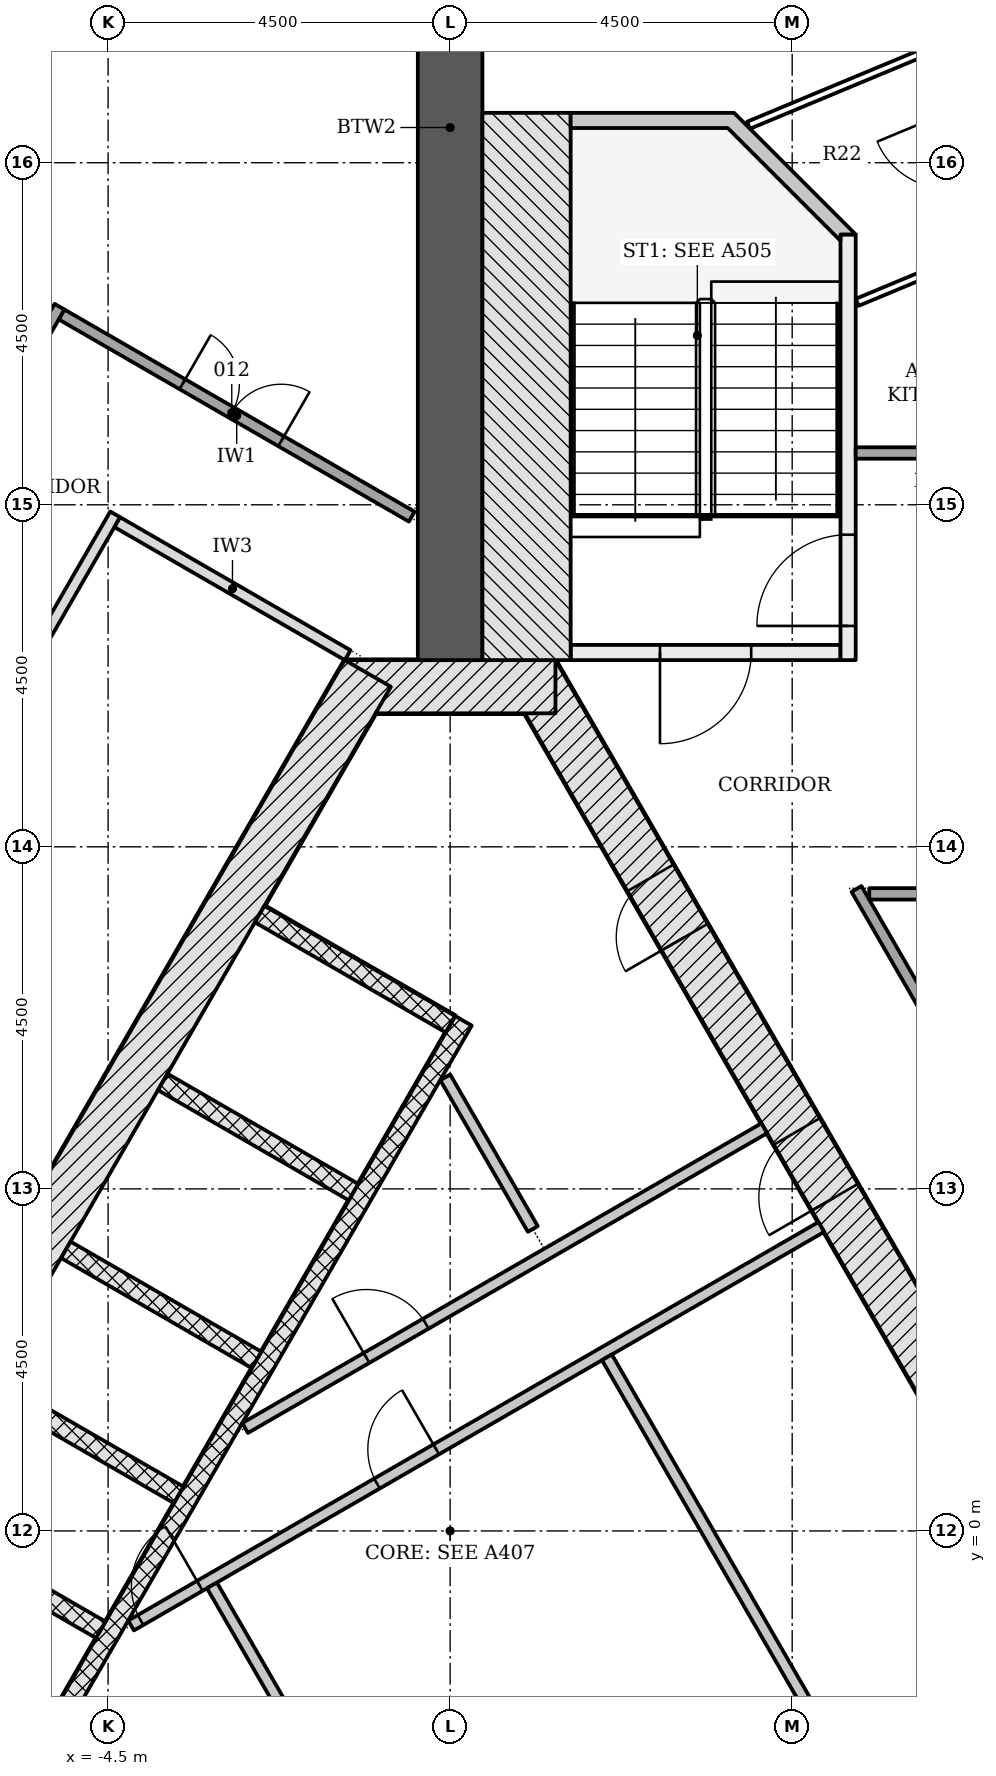
"""IFC4 building model, lengths in metres.
Left out: names, types, materials, properties, quantities, classifications, styles, units other than length and angle.
Written with IfcOpenShell. Run it as: python <this file> out.ifc"""

import sys

from ifc_helpers import new_model, si_unit, direction, frame, frame_2d, origin, place, context, subcontext, project, spatial, polyline, rectangle, outline, extrude, element, fill, save


model = new_model("IFC4")
c1 = context("Model", 3, precision=1e-05, world=origin(), true_north=direction((0.0, 1.0)))
c2 = subcontext(c1, "Body", "Model", "MODEL_VIEW")
j1 = project(units=[si_unit("LENGTHUNIT", "METRE"), si_unit("PLANEANGLEUNIT", "RADIAN")], contexts=[c1])
p1 = place(None, origin())
s1 = spatial("IfcSite", under=j1, at=p1, CompositionType="ELEMENT")
p2 = place(p1, origin())
s2 = spatial("IfcBuilding", under=s1, at=p2, CompositionType="ELEMENT")
p3 = place(p2, frame((0.0, 0.0, 45.6)))
s3 = spatial("IfcBuildingStorey", under=s2, at=p3, CompositionType="ELEMENT", Elevation=45.6)
p4 = place(p3, frame((10.311, -4.703, -0.2), z_axis=(0.0, 0.0, 1.0), x_axis=(-0.500001446645, 0.866024568562, 0.0)))
e1 = element("IfcWall", 1, at=p4, inside=s3, PredefinedType="SHEAR", context=c2, shape_type="SweptSolid", body=[
    extrude(rectangle(XDim=18.458, YDim=0.7, at=frame_2d((9.229, 0.0))), origin(), (0.0, 0.0, 1.0), 3.6),
])
p5 = place(p4, frame((10.5, 0.0, 0.2)))
e2 = element("IfcOpeningElement", 2, at=p5, cuts=e1, PredefinedType="OPENING", context=c2, shape_type="SweptSolid", body=[
    extrude(rectangle(XDim=1.0, YDim=2.1, at=frame_2d((0.5, 1.05))), frame((0.0, 0.36, 0.0), z_axis=(0.0, -1.0, 0.0), x_axis=(1.0, 0.0, 0.0)), (0.0, 0.0, 1.0), 0.72),
])
p6 = place(p4, frame((4.877, 0.0, 0.2)))
e3 = element("IfcOpeningElement", 3, at=p6, cuts=e1, PredefinedType="OPENING", context=c2, shape_type="SweptSolid", body=[
    extrude(rectangle(XDim=0.9, YDim=2.1, at=frame_2d((0.45, 1.05))), frame((0.0, 0.36, 0.0), z_axis=(0.0, -1.0, 0.0), x_axis=(1.0, 0.0, 0.0)), (0.0, 0.0, 1.0), 0.72),
])
p7 = place(p4, frame((14.452, 0.0, 0.2)))
e4 = element("IfcOpeningElement", 4, at=p7, cuts=e1, PredefinedType="OPENING", context=c2, shape_type="SweptSolid", body=[
    extrude(rectangle(XDim=0.9, YDim=2.1, at=frame_2d((0.45, 1.05))), frame((0.0, 0.36, 0.0), z_axis=(0.0, -1.0, 0.0), x_axis=(1.0, 0.0, 0.0)), (0.0, 0.0, 1.0), 0.72),
])
p8 = place(p3, frame((1.386, 11.106, -0.2), z_axis=(0.0, 0.0, 1.0), x_axis=(-1.0, 0.0, 0.0)))
e5 = element("IfcWall", 5, at=p8, inside=s3, PredefinedType="SHEAR", context=c2, shape_type="SweptSolid", body=[
    extrude(rectangle(XDim=2.771, YDim=0.7, at=frame_2d((1.386, 0.0))), origin(), (0.0, 0.0, 1.0), 3.6),
])
p9 = place(p3, frame((-1.083, 11.281, -0.2), z_axis=(0.0, 0.0, 1.0), x_axis=(-0.500001446645, -0.866024568562, 0.0)))
e6 = element("IfcWall", 6, at=p9, inside=s3, PredefinedType="SHEAR", context=c2, shape_type="SweptSolid", body=[
    extrude(rectangle(XDim=18.458, YDim=0.7, at=frame_2d((9.229, 0.0))), origin(), (0.0, 0.0, 1.0), 3.6),
])
p10 = place(p9, frame((8.979, 0.0, 0.2)))
e7 = element("IfcOpeningElement", 7, at=p10, cuts=e6, PredefinedType="OPENING", context=c2, shape_type="SweptSolid", body=[
    extrude(rectangle(XDim=1.2, YDim=2.1, at=frame_2d((0.6, 1.05))), frame((0.0, 0.36, 0.0), z_axis=(0.0, -1.0, 0.0), x_axis=(1.0, 0.0, 0.0)), (0.0, 0.0, 1.0), 0.72),
])
p11 = place(p9, frame((11.029, 0.0, 0.2)))
e8 = element("IfcOpeningElement", 8, at=p11, cuts=e6, PredefinedType="OPENING", context=c2, shape_type="SweptSolid", body=[
    extrude(rectangle(XDim=1.2, YDim=2.1, at=frame_2d((0.6, 1.05))), frame((0.0, 0.36, 0.0), z_axis=(0.0, -1.0, 0.0), x_axis=(1.0, 0.0, 0.0)), (0.0, 0.0, 1.0), 0.72),
])
p12 = place(p3, frame((0.0, 11.456, -0.2), z_axis=(0.0, 0.0, 1.0), x_axis=(0.0, 1.0, 0.0)))
e9 = element("IfcWall", 9, at=p12, inside=s3, PredefinedType="SHEAR", context=c2, shape_type="SweptSolid", body=[
    extrude(rectangle(XDim=14.014, YDim=0.85, at=frame_2d((7.007, 0.0))), origin(), (0.0, 0.0, 1.0), 3.6),
])
p13 = place(p3, frame((-2.506, 8.115, -0.2), z_axis=(0.0, 0.0, 1.0), x_axis=(0.865996321171, -0.50005036918, 0.0)))
e10 = element("IfcWall", 10, at=p13, inside=s3, PredefinedType="PARTITIONING", context=c2, shape_type="SweptSolid", body=[
    extrude(rectangle(XDim=2.9, YDim=0.25, at=frame_2d((1.45, 0.0))), origin(), (0.0, 0.0, 1.0), 3.6),
])
for number, where, z_axis, x_axis in (
    (11, (-3.781, 5.907, -0.2), (0.0, 0.0, 1.0), (0.866, -0.5, 0.0)),
    (12, (-5.056, 3.699, -0.2), (0.0, 0.0, 1.0), (0.866, -0.5, 0.0)),
    (13, (-6.081, 1.923, -0.2), (0.0, 0.0, 1.0), (0.866, -0.5, 0.0)),
    (14, (-7.106, 0.148, -0.2), (0.0, 0.0, 1.0), (0.866, -0.5, 0.0)),
):
    element("IfcWall", number, at=place(p3, frame(where, z_axis=z_axis, x_axis=x_axis)), inside=s3, PredefinedType="PARTITIONING", context=c2, shape_type="SweptSolid", body=[
        extrude(rectangle(XDim=2.9, YDim=0.25, at=frame_2d((1.45, 0.0))), origin(), (0.0, 0.0, 1.0), 3.6),
    ])
p14 = place(p3, frame((0.176, 6.711, 0.0), z_axis=(0.0, 0.0, 1.0), x_axis=(-0.500004227369, -0.866022963098, 0.0)))
e15 = element("IfcWall", 15, at=p14, inside=s3, PredefinedType="PARTITIONING", context=c2, shape_type="SweptSolid", body=[
    extrude(rectangle(XDim=11.8, YDim=0.25, at=frame_2d((5.9, 0.0))), origin(), (0.0, 0.0, 1.0), 3.4),
])
p15 = place(p3, frame((-4.198, -1.244, 0.0), z_axis=(0.0, 0.0, 1.0), x_axis=(0.866020798945, 0.500007975732, 0.0)))
e16 = element("IfcWall", 16, at=p15, inside=s3, PredefinedType="PARTITIONING", context=c2, shape_type="SweptSolid", body=[
    extrude(rectangle(XDim=10.486, YDim=0.15, at=frame_2d((5.243, 0.0))), origin(), (0.0, 0.0, 1.0), 3.4),
])
p16 = place(p15, frame((3.736, 0.0, 0.0)))
e17 = element("IfcOpeningElement", 17, at=p16, cuts=e16, PredefinedType="OPENING", context=c2, shape_type="SweptSolid", body=[
    extrude(rectangle(XDim=0.9, YDim=2.1, at=frame_2d((0.45, 1.05))), frame((0.0, 0.085, 0.0), z_axis=(0.0, -1.0, 0.0), x_axis=(1.0, 0.0, 0.0)), (0.0, 0.0, 1.0), 0.17),
])
p17 = place(p15, frame((0.144, 0.0, 0.0)))
e18 = element("IfcOpeningElement", 18, at=p17, cuts=e16, PredefinedType="OPENING", context=c2, shape_type="SweptSolid", body=[
    extrude(rectangle(XDim=0.9, YDim=2.1, at=frame_2d((0.45, 1.05))), frame((0.0, 0.085, 0.0), z_axis=(0.0, -1.0, 0.0), x_axis=(1.0, 0.0, 0.0)), (0.0, 0.0, 1.0), 0.17),
])
p18 = place(p3, frame((5.367, -3.439, 0.0), z_axis=(0.0, 0.0, 1.0), x_axis=(-0.499981499682, 0.866036084685, 0.0)))
e19 = element("IfcWall", 19, at=p18, inside=s3, PredefinedType="PARTITIONING", context=c2, shape_type="SweptSolid", body=[
    extrude(rectangle(XDim=6.608, YDim=0.15, at=frame_2d((3.304, 0.0))), origin(), (0.0, 0.0, 1.0), 3.4),
])
p19 = place(p3, frame((-1.561, -3.439, 0.0), z_axis=(0.0, 0.0, 1.0), x_axis=(-0.499989077369, 0.866031709877, 0.0)))
e20 = element("IfcWall", 20, at=p19, inside=s3, PredefinedType="PARTITIONING", context=c2, shape_type="SweptSolid", body=[
    extrude(rectangle(XDim=3.144, YDim=0.15, at=frame_2d((1.572, 0.0))), origin(), (0.0, 0.0, 1.0), 3.4),
])
p20 = place(p3, frame((-2.698, 1.354, 0.0), z_axis=(0.0, 0.0, 1.0), x_axis=(0.866021157486, 0.500007354732, 0.0)))
e21 = element("IfcWall", 21, at=p20, inside=s3, PredefinedType="PARTITIONING", context=c2, shape_type="SweptSolid", body=[
    extrude(rectangle(XDim=7.888, YDim=0.15, at=frame_2d((3.944, 0.0))), origin(), (0.0, 0.0, 1.0), 3.4),
])
p21 = place(p20, frame((1.845, 0.0, 0.0)))
e22 = element("IfcOpeningElement", 22, at=p21, cuts=e21, PredefinedType="OPENING", context=c2, shape_type="SweptSolid", body=[
    extrude(rectangle(XDim=0.9, YDim=2.1, at=frame_2d((0.45, 1.05))), frame((0.0, 0.085, 0.0), z_axis=(0.0, -1.0, 0.0), x_axis=(1.0, 0.0, 0.0)), (0.0, 0.0, 1.0), 0.17),
])
p22 = place(p3, frame((1.088, 3.972, 0.0), z_axis=(0.0, 0.0, 1.0), x_axis=(-0.500116913307, 0.865957893332, 0.0)))
e23 = element("IfcWall", 23, at=p22, inside=s3, PredefinedType="PARTITIONING", context=c2, shape_type="SweptSolid", body=[
    extrude(rectangle(XDim=2.304, YDim=0.15, at=frame_2d((1.152, 0.0))), origin(), (0.0, 0.0, 1.0), 3.4),
])
p23 = place(p3, frame((5.135, 11.556, -0.2), z_axis=(0.0, 0.0, 1.0), x_axis=(-1.0, 0.0, 0.0)))
e24 = element("IfcWall", 24, at=p23, inside=s3, PredefinedType="SHEAR", context=c2, shape_type="SweptSolid", body=[
    extrude(rectangle(XDim=3.55, YDim=0.2, at=frame_2d((1.775, 0.0))), origin(), (0.0, 0.0, 1.0), 3.6),
])
p24 = place(p23, frame((1.175, 0.0, 0.2)))
e25 = element("IfcOpeningElement", 25, at=p24, cuts=e24, PredefinedType="OPENING", context=c2, shape_type="SweptSolid", body=[
    extrude(rectangle(XDim=1.2, YDim=2.1, at=frame_2d((0.6, 1.05))), frame((0.0, 0.11, 0.0), z_axis=(0.0, -1.0, 0.0), x_axis=(1.0, 0.0, 0.0)), (0.0, 0.0, 1.0), 0.22),
])
p25 = place(p3, frame((5.236, 11.456, -0.2), z_axis=(0.0, 0.0, 1.0), x_axis=(0.0, 1.0, 0.0)))
e26 = element("IfcWall", 26, at=p25, inside=s3, PredefinedType="SHEAR", context=c2, shape_type="SweptSolid", body=[
    extrude(rectangle(XDim=5.6, YDim=0.2, at=frame_2d((2.8, 0.0))), origin(), (0.0, 0.0, 1.0), 3.6),
])
p26 = place(p25, frame((0.45, 0.0, 0.2)))
e27 = element("IfcOpeningElement", 27, at=p26, cuts=e26, PredefinedType="OPENING", context=c2, shape_type="SweptSolid", body=[
    extrude(rectangle(XDim=1.2, YDim=2.1, at=frame_2d((0.6, 1.05))), frame((0.0, 0.11, 0.0), z_axis=(0.0, -1.0, 0.0), x_axis=(1.0, 0.0, 0.0)), (0.0, 0.0, 1.0), 0.22),
])
p27 = place(p3, frame((1.005, 11.456, -0.2), z_axis=(0.0, 0.0, 1.0), x_axis=(0.0, 1.0, 0.0)))
e28 = element("IfcWall", 28, at=p27, inside=s3, PredefinedType="SHEAR", context=c2, shape_type="SweptSolid", body=[
    extrude(rectangle(XDim=7.2, YDim=1.161, at=frame_2d((3.6, 0.0))), origin(), (0.0, 0.0, 1.0), 3.6),
])
p28 = place(p3, frame((0.0, 0.0, -0.2)))
e29 = element("IfcWall", 29, at=p28, inside=s3, PredefinedType="SHEAR", context=c2, shape_type="SweptSolid", body=[
    extrude(outline(polyline([(5.336, 17.056), (3.736, 18.656), (1.586, 18.656), (1.586, 18.456), (3.653, 18.456), (5.135, 16.974), (5.135, 17.056), (5.135, 17.056), (5.135, 17.056), (5.135, 17.056), (5.135, 17.056), (5.135, 17.056), (5.135, 17.056), (5.135, 17.056), (5.135, 17.056), (5.135, 17.056), (5.135, 17.056), (5.135, 17.056), (5.135, 17.056), (5.135, 17.056), (5.135, 17.056), (5.135, 17.056), (5.135, 17.056), (5.336, 17.056)])), origin(), (0.0, 0.0, 1.0), 3.6),
])
p29 = place(p3, frame((-16.256, -3.149, 0.0), z_axis=(0.0, 0.0, 1.0), x_axis=(0.499999683919, 0.866025586274, 0.0)))
e30 = element("IfcWall", 30, at=p29, inside=s3, PredefinedType="PARTITIONING", context=c2, shape_type="SweptSolid", body=[
    extrude(rectangle(XDim=22.234, YDim=0.15, at=frame_2d((11.117, 0.0))), origin(), (0.0, 0.0, 1.0), 2.778),
])
p30 = place(p29, frame((17.842, 0.0, 0.0)))
e31 = element("IfcOpeningElement", 31, at=p30, cuts=e30, PredefinedType="OPENING", context=c2, shape_type="SweptSolid", body=[
    extrude(rectangle(XDim=1.0, YDim=2.1, at=frame_2d((0.5, 1.05))), frame((0.0, 0.085, 0.0), z_axis=(0.0, -1.0, 0.0), x_axis=(1.0, 0.0, 0.0)), (0.0, 0.0, 1.0), 0.17),
])
p31 = place(p29, frame((15.26, 0.0, 0.0)))
e32 = element("IfcOpeningElement", 32, at=p31, cuts=e30, PredefinedType="OPENING", context=c2, shape_type="SweptSolid", body=[
    extrude(rectangle(XDim=1.0, YDim=2.1, at=frame_2d((0.5, 1.05))), frame((0.0, 0.085, 0.0), z_axis=(0.0, -1.0, 0.0), x_axis=(1.0, 0.0, 0.0)), (0.0, 0.0, 1.0), 0.17),
])
p32 = place(p29, frame((11.92, 0.0, 0.0)))
e33 = element("IfcOpeningElement", 33, at=p32, cuts=e30, PredefinedType="OPENING", context=c2, shape_type="SweptSolid", body=[
    extrude(rectangle(XDim=1.5, YDim=2.1, at=frame_2d((0.75, 1.05))), frame((0.0, 0.085, 0.0), z_axis=(0.0, -1.0, 0.0), x_axis=(1.0, 0.0, 0.0)), (0.0, 0.0, 1.0), 0.17),
])
p33 = place(p29, frame((4.547, 0.0, 0.0)))
e34 = element("IfcOpeningElement", 34, at=p33, cuts=e30, PredefinedType="OPENING", context=c2, shape_type="SweptSolid", body=[
    extrude(rectangle(XDim=1.5, YDim=2.1, at=frame_2d((0.75, 1.05))), frame((0.0, 0.085, 0.0), z_axis=(0.0, -1.0, 0.0), x_axis=(1.0, 0.0, 0.0)), (0.0, 0.0, 1.0), 0.17),
])
p34 = place(p3, frame((-4.407, 13.374, 0.0), z_axis=(0.0, 0.0, 1.0), x_axis=(-0.499997181693, -0.866027030928, 0.0)))
e35 = element("IfcWall", 35, at=p34, inside=s3, PredefinedType="PARTITIONING", context=c2, shape_type="SweptSolid", body=[
    extrude(rectangle(XDim=16.77, YDim=0.15, at=frame_2d((8.385, 0.0))), origin(), (0.0, 0.0, 1.0), 2.778),
])
p35 = place(p34, frame((8.879, 0.0, 0.0)))
e36 = element("IfcOpeningElement", 36, at=p35, cuts=e35, PredefinedType="OPENING", context=c2, shape_type="SweptSolid", body=[
    extrude(rectangle(XDim=1.0, YDim=2.1, at=frame_2d((0.5, 1.05))), frame((0.0, 0.085, 0.0), z_axis=(0.0, -1.0, 0.0), x_axis=(1.0, 0.0, 0.0)), (0.0, 0.0, 1.0), 0.17),
])
p36 = place(p3, frame((5.346, 8.446, 0.0), z_axis=(0.0, 0.0, 1.0), x_axis=(0.500008781656, -0.866020333634, 0.0)))
e37 = element("IfcWall", 37, at=p36, inside=s3, PredefinedType="PARTITIONING", context=c2, shape_type="SweptSolid", body=[
    extrude(rectangle(XDim=15.057, YDim=0.15, at=frame_2d((7.528, 0.0))), origin(), (0.0, 0.0, 1.0), 2.778),
])
p37 = place(p36, frame((9.446, 0.0, 0.0)))
e38 = element("IfcOpeningElement", 38, at=p37, cuts=e37, PredefinedType="OPENING", context=c2, shape_type="SweptSolid", body=[
    extrude(rectangle(XDim=1.0, YDim=2.1, at=frame_2d((0.5, 1.05))), frame((0.0, 0.085, 0.0), z_axis=(0.0, -1.0, 0.0), x_axis=(1.0, 0.0, 0.0)), (0.0, 0.0, 1.0), 0.17),
])
p38 = place(p36, frame((1.892, 0.0, 0.0)))
e39 = element("IfcOpeningElement", 39, at=p38, cuts=e37, PredefinedType="OPENING", context=c2, shape_type="SweptSolid", body=[
    extrude(rectangle(XDim=1.0, YDim=2.1, at=frame_2d((0.5, 1.05))), frame((0.0, 0.085, 0.0), z_axis=(0.0, -1.0, 0.0), x_axis=(1.0, 0.0, 0.0)), (0.0, 0.0, 1.0), 0.17),
])
p39 = place(p3, frame((-5.111, 16.003, 0.0), z_axis=(0.0, 0.0, 1.0), x_axis=(0.866034245675, -0.499984685083, 0.0)))
e40 = element("IfcWall", 40, at=p39, inside=s3, PredefinedType="PARTITIONING", context=c2, shape_type="SweptSolid", body=[
    extrude(rectangle(XDim=5.319, YDim=0.15, at=frame_2d((2.66, 0.0))), origin(), (0.0, 0.0, 1.0), 3.4),
])
p40 = place(p39, frame((1.834, 0.0, 0.0)))
e41 = element("IfcOpeningElement", 41, at=p40, cuts=e40, PredefinedType="OPENING", context=c2, shape_type="SweptSolid", body=[
    extrude(rectangle(XDim=1.5, YDim=2.1, at=frame_2d((0.75, 1.05))), frame((0.0, 0.085, 0.0), z_axis=(0.0, -1.0, 0.0), x_axis=(1.0, 0.0, 0.0)), (0.0, 0.0, 1.0), 0.17),
])
p41 = place(p3, frame((-4.379, 13.271, 0.0), z_axis=(0.0, 0.0, 1.0), x_axis=(0.866019471182, -0.500010275428, 0.0)))
e42 = element("IfcWall", 42, at=p41, inside=s3, PredefinedType="PARTITIONING", context=c2, shape_type="SweptSolid", body=[
    extrude(rectangle(XDim=3.5, YDim=0.15, at=frame_2d((1.75, 0.0))), origin(), (0.0, 0.0, 1.0), 3.4),
])
p42 = place(p3, frame((5.336, 14.181, 0.0), z_axis=(0.0, 0.0, 1.0), x_axis=(1.0, 0.0, 0.0)))
e43 = element("IfcWall", 43, at=p42, inside=s3, PredefinedType="PARTITIONING", context=c2, shape_type="SweptSolid", body=[
    extrude(rectangle(XDim=2.05, YDim=0.15, at=frame_2d((1.025, 0.0))), origin(), (0.0, 0.0, 1.0), 2.923),
])
p43 = place(p3, frame((5.514, 8.381, 0.0), z_axis=(0.0, 0.0, 1.0), x_axis=(1.0, 0.0, 0.0)))
e44 = element("IfcWall", 44, at=p43, inside=s3, PredefinedType="PARTITIONING", context=c2, shape_type="SweptSolid", body=[
    extrude(rectangle(XDim=1.872, YDim=0.15, at=frame_2d((0.936, 0.0))), origin(), (0.0, 0.0, 1.0), 2.778),
])
p44 = place(p3, frame((3.926, 18.493, 0.0), z_axis=(0.0, 0.0, 1.0), x_axis=(0.923190161015, 0.384343500798, 0.0)))
e45 = element("IfcWall", 45, at=p44, inside=s3, PredefinedType="PARTITIONING", context=c2, shape_type="SweptSolid", body=[
    extrude(rectangle(XDim=4.336, YDim=0.1, at=frame_2d((2.168, 0.0))), origin(), (0.0, 0.0, 1.0), 2.923),
])
p45 = place(p44, frame((2.902, 0.0, 0.0)))
e46 = element("IfcOpeningElement", 46, at=p45, cuts=e45, PredefinedType="OPENING", context=c2, shape_type="SweptSolid", body=[
    extrude(rectangle(XDim=1.0, YDim=2.1, at=frame_2d((0.5, 1.05))), frame((0.0, 0.06, 0.0), z_axis=(0.0, -1.0, 0.0), x_axis=(1.0, 0.0, 0.0)), (0.0, 0.0, 1.0), 0.12),
])
p46 = place(p3, frame((5.355, 16.163, 0.0), z_axis=(0.0, 0.0, 1.0), x_axis=(0.923206524755, 0.38430419286, 0.0)))
e47 = element("IfcWall", 47, at=p46, inside=s3, PredefinedType="PARTITIONING", context=c2, shape_type="SweptSolid", body=[
    extrude(rectangle(XDim=2.006, YDim=0.1, at=frame_2d((1.003, 0.0))), origin(), (0.0, 0.0, 1.0), 3.4),
])
p47 = place(p5, origin())
e48 = element("IfcDoor", 48, at=p47, inside=s3, OperationType="SINGLE_SWING_LEFT", PredefinedType="DOOR", context=c2, shape_type="SweptSolid", body=[
    extrude(rectangle(XDim=1.0, YDim=2.1, at=frame_2d((0.5, 1.05))), frame((0.0, 0.075, 0.0), z_axis=(0.0, -1.0, 0.0), x_axis=(1.0, 0.0, 0.0)), (0.0, 0.0, 1.0), 0.15),
])
fill(e2, e48)
p48 = place(p7, origin())
e49 = element("IfcDoor", 49, at=p48, inside=s3, OperationType="SINGLE_SWING_LEFT", PredefinedType="DOOR", context=c2, shape_type="SweptSolid", body=[
    extrude(rectangle(XDim=0.9, YDim=2.1, at=frame_2d((0.45, 1.05))), frame((0.0, 0.075, 0.0), z_axis=(0.0, -1.0, 0.0), x_axis=(1.0, 0.0, 0.0)), (0.0, 0.0, 1.0), 0.15),
])
fill(e4, e49)
p49 = place(p16, origin())
e50 = element("IfcDoor", 50, at=p49, inside=s3, OperationType="SINGLE_SWING_RIGHT", PredefinedType="DOOR", context=c2, shape_type="SweptSolid", body=[
    extrude(rectangle(XDim=0.9, YDim=2.1, at=frame_2d((0.45, 1.05))), frame((0.0, 0.025, 0.0), z_axis=(0.0, -1.0, 0.0), x_axis=(1.0, 0.0, 0.0)), (0.0, 0.0, 1.0), 0.05),
])
fill(e17, e50)
p50 = place(p21, origin())
e51 = element("IfcDoor", 51, at=p50, inside=s3, OperationType="SINGLE_SWING_LEFT", PredefinedType="DOOR", context=c2, shape_type="SweptSolid", body=[
    extrude(rectangle(XDim=0.9, YDim=2.1, at=frame_2d((0.45, 1.05))), frame((0.0, 0.025, 0.0), z_axis=(0.0, -1.0, 0.0), x_axis=(1.0, 0.0, 0.0)), (0.0, 0.0, 1.0), 0.05),
])
fill(e22, e51)
p51 = place(p17, origin())
e52 = element("IfcDoor", 52, at=p51, inside=s3, OperationType="SINGLE_SWING_RIGHT", PredefinedType="DOOR", context=c2, shape_type="SweptSolid", body=[
    extrude(rectangle(XDim=0.9, YDim=2.1, at=frame_2d((0.45, 1.05))), frame((0.0, 0.025, 0.0), z_axis=(0.0, -1.0, 0.0), x_axis=(1.0, 0.0, 0.0)), (0.0, 0.0, 1.0), 0.05),
])
fill(e18, e52)
p52 = place(p24, origin())
e53 = element("IfcDoor", 53, at=p52, inside=s3, OperationType="SINGLE_SWING_RIGHT", PredefinedType="DOOR", context=c2, shape_type="SweptSolid", body=[
    extrude(rectangle(XDim=1.2, YDim=2.1, at=frame_2d((0.6, 1.05))), frame((0.0, 0.025, 0.0), z_axis=(0.0, -1.0, 0.0), x_axis=(1.0, 0.0, 0.0)), (0.0, 0.0, 1.0), 0.05),
])
fill(e25, e53)
p53 = place(p26, origin())
e54 = element("IfcDoor", 54, at=p53, inside=s3, OperationType="SINGLE_SWING_LEFT", PredefinedType="DOOR", context=c2, shape_type="SweptSolid", body=[
    extrude(rectangle(XDim=1.2, YDim=2.1, at=frame_2d((0.6, 1.05))), frame((0.0, 0.025, 0.0), z_axis=(0.0, -1.0, 0.0), x_axis=(1.0, 0.0, 0.0)), (0.0, 0.0, 1.0), 0.05),
])
fill(e27, e54)
p54 = place(p40, origin())
e55 = element("IfcDoor", 55, at=p54, inside=s3, OperationType="DOUBLE_DOOR_SINGLE_SWING", PredefinedType="DOOR", context=c2, shape_type="SweptSolid", body=[
    extrude(rectangle(XDim=1.5, YDim=2.1, at=frame_2d((0.75, 1.05))), frame((0.0, 0.025, 0.0), z_axis=(0.0, -1.0, 0.0), x_axis=(1.0, 0.0, 0.0)), (0.0, 0.0, 1.0), 0.05),
])
fill(e41, e55)
save(model, sys.argv[1])
